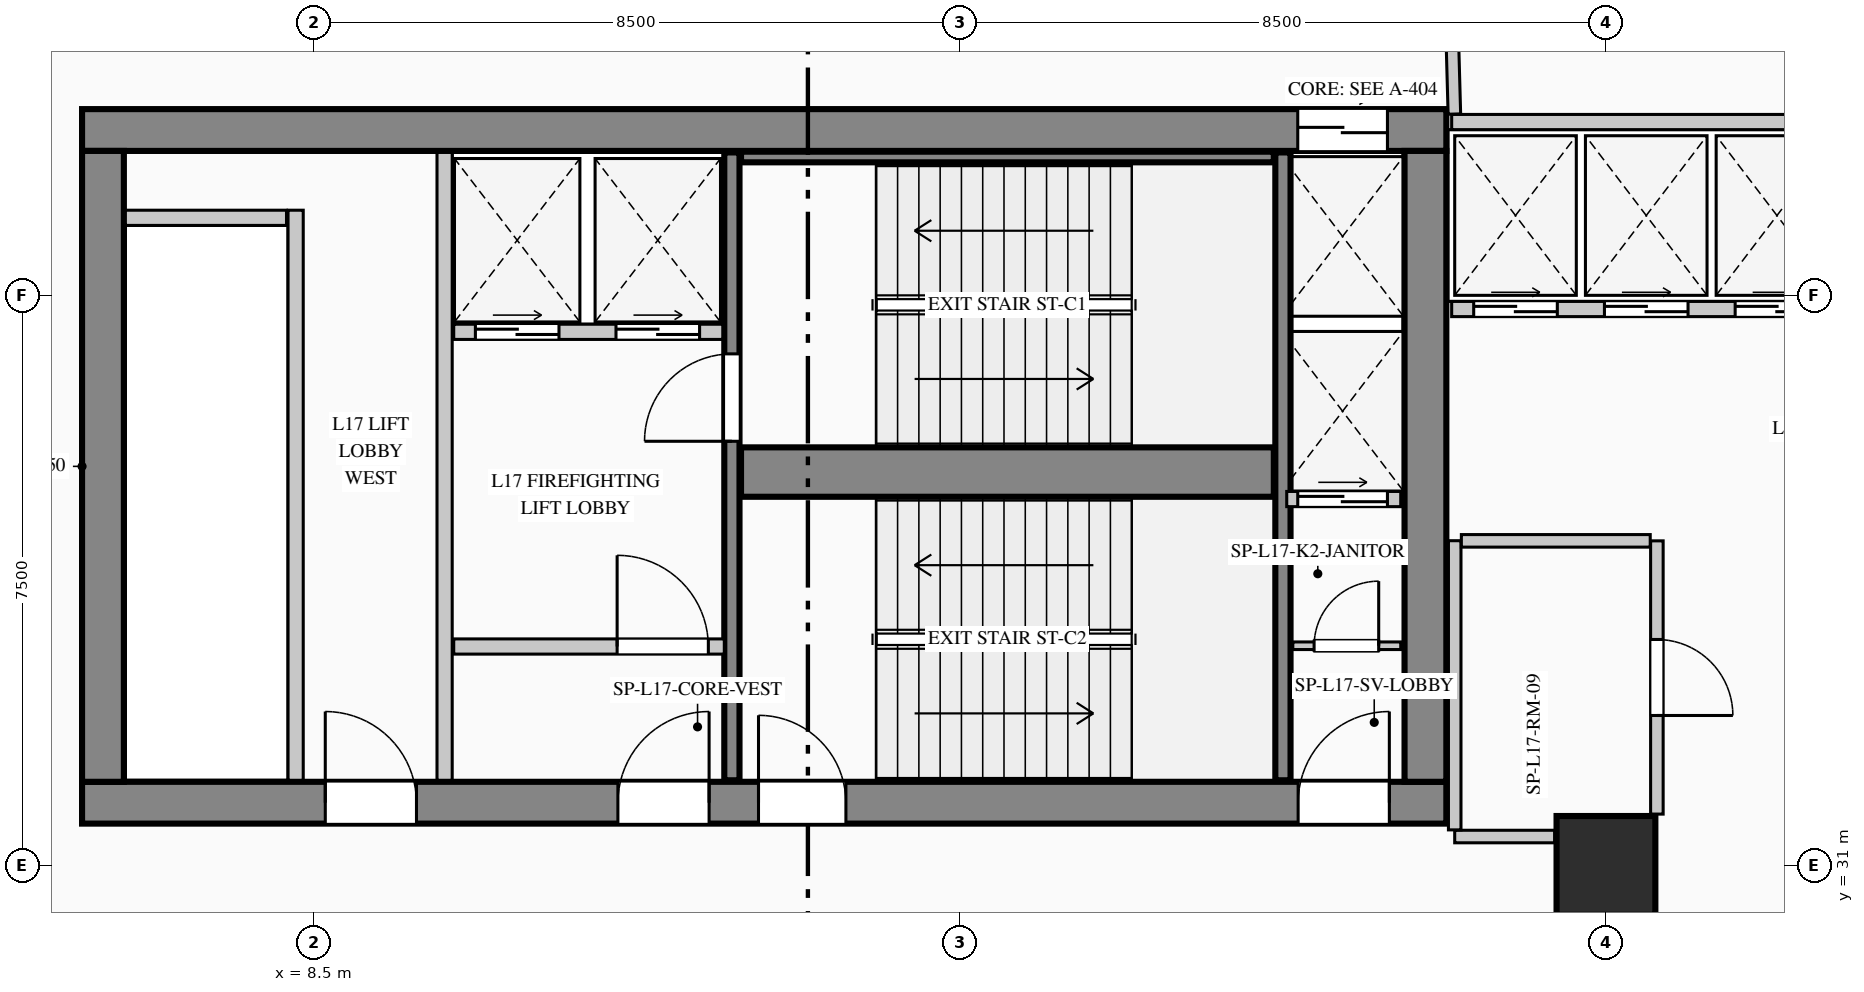
"""IFC4 building model, lengths in metres.
Left out: names, types, materials, properties, quantities, classifications, styles, units other than length and angle.
Written with IfcOpenShell. Run it as: python <this file> out.ifc"""

import sys

from ifc_helpers import new_model, si_unit, direction, frame, frame_2d, origin, origin_2d, place, context, subcontext, project, spatial, rectangle, extrude, element, fill, save


model = new_model("IFC4")
c1 = context("Model", 3, precision=1e-05, world=origin(), true_north=direction((0.0, 1.0)))
c2 = subcontext(c1, "Body", "Model", "MODEL_VIEW")
j1 = project(units=[si_unit("LENGTHUNIT", "METRE"), si_unit("PLANEANGLEUNIT", "RADIAN")], contexts=[c1])
p1 = place(None, origin())
s1 = spatial("IfcSite", under=j1, at=p1, CompositionType="ELEMENT")
p2 = place(p1, origin())
s2 = spatial("IfcBuilding", under=s1, at=p2, CompositionType="ELEMENT")
p3 = place(p2, frame((0.0, 0.0, 75.4)))
s3 = spatial("IfcBuildingStorey", under=s2, at=p3, CompositionType="ELEMENT", Elevation=75.4)
p4 = place(p3, frame((5.45, 40.675, 0.0), z_axis=(0.0, 0.0, 1.0), x_axis=(1.0, 0.0, 0.0)))
e1 = element("IfcWall", 1, at=p4, inside=s3, PredefinedType="SHEAR", context=c2, shape_type="SweptSolid", body=[
    extrude(rectangle(XDim=17.95, YDim=0.55, at=frame_2d((8.975, 0.0))), origin(), (0.0, 0.0, 1.0), 4.4),
])
p5 = place(p4, frame((15.995, 0.0, 0.0)))
e2 = element("IfcOpeningElement", 2, at=p5, cuts=e1, PredefinedType="OPENING", context=c2, shape_type="SweptSolid", body=[
    extrude(rectangle(XDim=1.18, YDim=2.25, at=frame_2d((0.59, 1.125))), frame((0.0, 0.285, 0.0), z_axis=(0.0, -1.0, 0.0), x_axis=(1.0, 0.0, 0.0)), (0.0, 0.0, 1.0), 0.57),
])
p6 = place(p3, frame((5.45, 31.825, 0.0), z_axis=(0.0, 0.0, 1.0), x_axis=(1.0, 0.0, 0.0)))
e3 = element("IfcWall", 3, at=p6, inside=s3, PredefinedType="SHEAR", context=c2, shape_type="SweptSolid", body=[
    extrude(rectangle(XDim=17.95, YDim=0.55, at=frame_2d((8.975, 0.0))), origin(), (0.0, 0.0, 1.0), 4.4),
])
p7 = place(p6, frame((3.2, 0.0, 0.0)))
e4 = element("IfcOpeningElement", 4, at=p7, cuts=e3, PredefinedType="OPENING", context=c2, shape_type="SweptSolid", body=[
    extrude(rectangle(XDim=1.2, YDim=2.2, at=frame_2d((0.6, 1.1))), frame((0.0, 0.285, 0.0), z_axis=(0.0, -1.0, 0.0), x_axis=(1.0, 0.0, 0.0)), (0.0, 0.0, 1.0), 0.57),
])
p8 = place(p6, frame((7.05, 0.0, 0.0)))
e5 = element("IfcOpeningElement", 5, at=p8, cuts=e3, PredefinedType="OPENING", context=c2, shape_type="SweptSolid", body=[
    extrude(rectangle(XDim=1.2, YDim=2.2, at=frame_2d((0.6, 1.1))), frame((0.0, 0.285, 0.0), z_axis=(0.0, -1.0, 0.0), x_axis=(1.0, 0.0, 0.0)), (0.0, 0.0, 1.0), 0.57),
])
p9 = place(p6, frame((8.9, 0.0, 0.0)))
e6 = element("IfcOpeningElement", 6, at=p9, cuts=e3, PredefinedType="OPENING", context=c2, shape_type="SweptSolid", body=[
    extrude(rectangle(XDim=1.15, YDim=2.2, at=frame_2d((0.575, 1.1))), frame((0.0, 0.285, 0.0), z_axis=(0.0, -1.0, 0.0), x_axis=(1.0, 0.0, 0.0)), (0.0, 0.0, 1.0), 0.57),
])
p10 = place(p6, frame((16.0, 0.0, 0.0)))
e7 = element("IfcOpeningElement", 7, at=p10, cuts=e3, PredefinedType="OPENING", context=c2, shape_type="SweptSolid", body=[
    extrude(rectangle(XDim=1.2, YDim=2.2, at=frame_2d((0.6, 1.1))), frame((0.0, 0.285, 0.0), z_axis=(0.0, -1.0, 0.0), x_axis=(1.0, 0.0, 0.0)), (0.0, 0.0, 1.0), 0.57),
])
for number, where, z_axis, x_axis in (
    (8, (5.725, 32.1, 0.0), (0.0, 0.0, 1.0), (0.0, 1.0, 0.0)),
    (9, (23.125, 32.1, 0.0), (0.0, 0.0, 1.0), (0.0, 1.0, 0.0)),
):
    element("IfcWall", number, at=place(p3, frame(where, z_axis=z_axis, x_axis=x_axis)), inside=s3, PredefinedType="SHEAR", context=c2, shape_type="SweptSolid", body=[
        extrude(rectangle(XDim=8.3, YDim=0.55, at=frame_2d((4.15, 0.0))), origin(), (0.0, 0.0, 1.0), 4.4),
    ])
p11 = place(p3, frame((14.0, 32.12, 0.0), z_axis=(0.0, 0.0, 1.0), x_axis=(0.0, 1.0, 0.0)))
e10 = element("IfcWall", 10, at=p11, inside=s3, PredefinedType="SHEAR", context=c2, shape_type="SweptSolid", body=[
    extrude(rectangle(XDim=8.26, YDim=0.2, at=frame_2d((4.13, 0.0))), origin(), (0.0, 0.0, 1.0), 4.4),
])
p12 = place(p11, frame((4.46, 0.0, 0.0)))
e11 = element("IfcOpeningElement", 11, at=p12, cuts=e10, PredefinedType="OPENING", context=c2, shape_type="SweptSolid", body=[
    extrude(rectangle(XDim=1.15, YDim=2.2, at=frame_2d((0.575, 1.1))), frame((0.0, 0.11, 0.0), z_axis=(0.0, -1.0, 0.0), x_axis=(1.0, 0.0, 0.0)), (0.0, 0.0, 1.0), 0.22),
])
p13 = place(p3, frame((14.12, 36.175, 0.0), z_axis=(0.0, 0.0, 1.0), x_axis=(1.0, 0.0, 0.0)))
e12 = element("IfcWall", 12, at=p13, inside=s3, PredefinedType="SHEAR", context=c2, shape_type="SweptSolid", body=[
    extrude(rectangle(XDim=7.01, YDim=0.65, at=frame_2d((3.505, 0.0))), origin(), (0.0, 0.0, 1.0), 4.4),
])
p14 = place(p3, frame((21.25, 32.12, 0.0), z_axis=(0.0, 0.0, 1.0), x_axis=(0.0, 1.0, 0.0)))
e13 = element("IfcWall", 13, at=p14, inside=s3, PredefinedType="SHEAR", context=c2, shape_type="SweptSolid", body=[
    extrude(rectangle(XDim=8.26, YDim=0.2, at=frame_2d((4.13, 0.0))), origin(), (0.0, 0.0, 1.0), 4.4),
])
p15 = place(p3, frame((14.12, 40.32, 0.0), z_axis=(0.0, 0.0, 1.0), x_axis=(1.0, 0.0, 0.0)))
e14 = element("IfcWall", 14, at=p15, inside=s3, PredefinedType="SHEAR", context=c2, shape_type="SweptSolid", body=[
    extrude(rectangle(XDim=7.01, YDim=0.14, at=frame_2d((3.505, 0.0))), origin(), (0.0, 0.0, 1.0), 4.4),
])
p16 = place(p3, frame((25.5, 31.0, 0.0), z_axis=(0.0, 0.0, 1.0), x_axis=(1.0, 0.0, 0.0)))
e15 = element("IfcColumn", 15, at=p16, inside=s3, PredefinedType="COLUMN", context=c2, shape_type="SweptSolid", body=[
    extrude(rectangle(XDim=1.3, YDim=1.3, at=origin_2d()), origin(), (0.0, 0.0, 1.0), 4.4),
])
p17 = place(p3, frame((8.523, 4.84, 0.0), z_axis=(0.0, 0.0, 1.0), x_axis=(-0.150394554312, 0.988626055712, 0.0)))
e16 = element("IfcWall", 16, at=p17, inside=s3, PredefinedType="STANDARD", context=c2, shape_type="SweptSolid", body=[
    extrude(rectangle(XDim=36.738, YDim=0.28, at=frame_2d((18.369, 0.0))), origin(), (0.0, 0.0, 1.0), 4.115),
])
p18 = place(p17, frame((22.612, 0.0, 0.9)))
e17 = element("IfcOpeningElement", 17, at=p18, cuts=e16, PredefinedType="OPENING", context=c2, shape_type="SweptSolid", body=[
    extrude(rectangle(XDim=1.8, YDim=2.1, at=frame_2d((0.9, 1.05))), frame((0.0, 0.15, 0.0), z_axis=(0.0, -1.0, 0.0), x_axis=(1.0, 0.0, 0.0)), (0.0, 0.0, 1.0), 0.3),
])
p19 = place(p3, frame((8.26, 32.12, 0.0), z_axis=(0.0, 0.0, 1.0), x_axis=(0.0, 1.0, 0.0)))
e18 = element("IfcWall", 18, at=p19, inside=s3, PredefinedType="PARTITIONING", context=c2, shape_type="SweptSolid", body=[
    extrude(rectangle(XDim=7.5, YDim=0.2, at=frame_2d((3.75, 0.0))), origin(), (0.0, 0.0, 1.0), 4.115),
])
p20 = place(p3, frame((6.02, 39.52, 0.0), z_axis=(0.0, 0.0, 1.0), x_axis=(1.0, 0.0, 0.0)))
e19 = element("IfcWall", 19, at=p20, inside=s3, PredefinedType="PARTITIONING", context=c2, shape_type="SweptSolid", body=[
    extrude(rectangle(XDim=2.12, YDim=0.2, at=frame_2d((1.06, 0.0))), origin(), (0.0, 0.0, 1.0), 4.115),
])
p21 = place(p3, frame((10.22, 32.12, 0.0), z_axis=(0.0, 0.0, 1.0), x_axis=(0.0, 1.0, 0.0)))
e20 = element("IfcWall", 20, at=p21, inside=s3, PredefinedType="PARTITIONING", context=c2, shape_type="SweptSolid", body=[
    extrude(rectangle(XDim=8.26, YDim=0.2, at=frame_2d((4.13, 0.0))), origin(), (0.0, 0.0, 1.0), 4.115),
])
p22 = place(p3, frame((10.34, 38.02, 0.0), z_axis=(0.0, 0.0, 1.0), x_axis=(1.0, 0.0, 0.0)))
e21 = element("IfcWall", 21, at=p22, inside=s3, PredefinedType="PARTITIONING", context=c2, shape_type="SweptSolid", body=[
    extrude(rectangle(XDim=3.54, YDim=0.2, at=frame_2d((1.77, 0.0))), origin(), (0.0, 0.0, 1.0), 4.115),
])
p23 = place(p22, frame((0.285, 0.0, 0.0)))
e22 = element("IfcOpeningElement", 22, at=p23, cuts=e21, PredefinedType="OPENING", context=c2, shape_type="SweptSolid", body=[
    extrude(rectangle(XDim=1.1, YDim=2.2, at=frame_2d((0.55, 1.1))), frame((0.0, 0.11, 0.0), z_axis=(0.0, -1.0, 0.0), x_axis=(1.0, 0.0, 0.0)), (0.0, 0.0, 1.0), 0.22),
])
p24 = place(p22, frame((2.135, 0.0, 0.0)))
e23 = element("IfcOpeningElement", 23, at=p24, cuts=e21, PredefinedType="OPENING", context=c2, shape_type="SweptSolid", body=[
    extrude(rectangle(XDim=1.1, YDim=2.2, at=frame_2d((0.55, 1.1))), frame((0.0, 0.11, 0.0), z_axis=(0.0, -1.0, 0.0), x_axis=(1.0, 0.0, 0.0)), (0.0, 0.0, 1.0), 0.22),
])
p25 = place(p3, frame((10.34, 33.88, 0.0), z_axis=(0.0, 0.0, 1.0), x_axis=(1.0, 0.0, 0.0)))
e24 = element("IfcWall", 24, at=p25, inside=s3, PredefinedType="PARTITIONING", context=c2, shape_type="SweptSolid", body=[
    extrude(rectangle(XDim=3.56, YDim=0.2, at=frame_2d((1.78, 0.0))), origin(), (0.0, 0.0, 1.0), 4.115),
])
p26 = place(p25, frame((2.15, 0.0, 0.0)))
e25 = element("IfcOpeningElement", 25, at=p26, cuts=e24, PredefinedType="OPENING", context=c2, shape_type="SweptSolid", body=[
    extrude(rectangle(XDim=1.2, YDim=2.2, at=frame_2d((0.6, 1.1))), frame((0.0, 0.11, 0.0), z_axis=(0.0, -1.0, 0.0), x_axis=(1.0, 0.0, 0.0)), (0.0, 0.0, 1.0), 0.22),
])
p27 = place(p3, frame((21.38, 33.89, 0.0), z_axis=(0.0, 0.0, 1.0), x_axis=(1.0, 0.0, 0.0)))
e26 = element("IfcWall", 26, at=p27, inside=s3, PredefinedType="PARTITIONING", context=c2, shape_type="SweptSolid", body=[
    extrude(rectangle(XDim=1.42, YDim=0.1, at=frame_2d((0.71, 0.0))), origin(), (0.0, 0.0, 1.0), 4.115),
])
p28 = place(p27, frame((0.28, 0.0, 0.0)))
e27 = element("IfcOpeningElement", 27, at=p28, cuts=e26, PredefinedType="OPENING", context=c2, shape_type="SweptSolid", body=[
    extrude(rectangle(XDim=0.85, YDim=2.1, at=frame_2d((0.425, 1.05))), frame((0.0, 0.06, 0.0), z_axis=(0.0, -1.0, 0.0), x_axis=(1.0, 0.0, 0.0)), (0.0, 0.0, 1.0), 0.12),
])
p29 = place(p3, frame((21.3, 35.82, 0.0), z_axis=(0.0, 0.0, 1.0), x_axis=(1.0, 0.0, 0.0)))
e28 = element("IfcWall", 28, at=p29, inside=s3, PredefinedType="PARTITIONING", context=c2, shape_type="SweptSolid", body=[
    extrude(rectangle(XDim=1.5, YDim=0.2, at=frame_2d((0.75, 0.0))), origin(), (0.0, 0.0, 1.0), 4.115),
])
p30 = place(p29, frame((0.145, 0.0, 0.0)))
e29 = element("IfcOpeningElement", 29, at=p30, cuts=e28, PredefinedType="OPENING", context=c2, shape_type="SweptSolid", body=[
    extrude(rectangle(XDim=1.18, YDim=2.25, at=frame_2d((0.59, 1.125))), frame((0.0, 0.11, 0.0), z_axis=(0.0, -1.0, 0.0), x_axis=(1.0, 0.0, 0.0)), (0.0, 0.0, 1.0), 0.22),
])
p31 = place(p3, frame((23.47, 40.78, 0.0), z_axis=(0.0, 0.0, 1.0), x_axis=(1.0, 0.0, 0.0)))
e30 = element("IfcWall", 30, at=p31, inside=s3, PredefinedType="PARTITIONING", context=c2, shape_type="SweptSolid", body=[
    extrude(rectangle(XDim=6.91, YDim=0.2, at=frame_2d((3.455, 0.0))), origin(), (0.0, 0.0, 1.0), 4.115),
])
p32 = place(p3, frame((23.47, 38.32, 0.0), z_axis=(0.0, 0.0, 1.0), x_axis=(1.0, 0.0, 0.0)))
e31 = element("IfcWall", 31, at=p32, inside=s3, PredefinedType="PARTITIONING", context=c2, shape_type="SweptSolid", body=[
    extrude(rectangle(XDim=6.79, YDim=0.2, at=frame_2d((3.395, 0.0))), origin(), (0.0, 0.0, 1.0), 4.115),
])
p33 = place(p32, frame((0.29, 0.0, 0.0)))
e32 = element("IfcOpeningElement", 32, at=p33, cuts=e31, PredefinedType="OPENING", context=c2, shape_type="SweptSolid", body=[
    extrude(rectangle(XDim=1.1, YDim=2.2, at=frame_2d((0.55, 1.1))), frame((0.0, 0.11, 0.0), z_axis=(0.0, -1.0, 0.0), x_axis=(1.0, 0.0, 0.0)), (0.0, 0.0, 1.0), 0.22),
])
p34 = place(p32, frame((2.01, 0.0, 0.0)))
e33 = element("IfcOpeningElement", 33, at=p34, cuts=e31, PredefinedType="OPENING", context=c2, shape_type="SweptSolid", body=[
    extrude(rectangle(XDim=1.1, YDim=2.2, at=frame_2d((0.55, 1.1))), frame((0.0, 0.11, 0.0), z_axis=(0.0, -1.0, 0.0), x_axis=(1.0, 0.0, 0.0)), (0.0, 0.0, 1.0), 0.22),
])
p35 = place(p32, frame((3.73, 0.0, 0.0)))
e34 = element("IfcOpeningElement", 34, at=p35, cuts=e31, PredefinedType="OPENING", context=c2, shape_type="SweptSolid", body=[
    extrude(rectangle(XDim=1.1, YDim=2.2, at=frame_2d((0.55, 1.1))), frame((0.0, 0.11, 0.0), z_axis=(0.0, -1.0, 0.0), x_axis=(1.0, 0.0, 0.0)), (0.0, 0.0, 1.0), 0.22),
])
p36 = place(p32, frame((5.45, 0.0, 0.0)))
e35 = element("IfcOpeningElement", 35, at=p36, cuts=e31, PredefinedType="OPENING", context=c2, shape_type="SweptSolid", body=[
    extrude(rectangle(XDim=1.1, YDim=2.2, at=frame_2d((0.55, 1.1))), frame((0.0, 0.11, 0.0), z_axis=(0.0, -1.0, 0.0), x_axis=(1.0, 0.0, 0.0)), (0.0, 0.0, 1.0), 0.22),
])
p37 = place(p3, frame((26.17, 35.27, 0.0), z_axis=(0.0, 0.0, 1.0), x_axis=(0.0, -1.0, 0.0)))
e36 = element("IfcWall", 36, at=p37, inside=s3, PredefinedType="PARTITIONING", context=c2, shape_type="SweptSolid", body=[
    extrude(rectangle(XDim=3.595, YDim=0.165, at=frame_2d((1.797, 0.0))), origin(), (0.0, 0.0, 1.0), 4.115),
])
p38 = place(p37, frame((1.298, 0.0, 0.0)))
e37 = element("IfcOpeningElement", 37, at=p38, cuts=e36, PredefinedType="OPENING", context=c2, shape_type="SweptSolid", body=[
    extrude(rectangle(XDim=1.0, YDim=2.15, at=frame_2d((0.5, 1.075))), frame((0.0, 0.093, 0.0), z_axis=(0.0, -1.0, 0.0), x_axis=(1.0, 0.0, 0.0)), (0.0, 0.0, 1.0), 0.185),
])
p39 = place(p3, frame((24.825, 31.38, 0.0), z_axis=(0.0, 0.0, 1.0), x_axis=(-1.0, 0.0, 0.0)))
e38 = element("IfcWall", 38, at=p39, inside=s3, PredefinedType="PARTITIONING", context=c2, shape_type="SweptSolid", body=[
    extrude(rectangle(XDim=1.315, YDim=0.165, at=frame_2d((0.657, 0.0))), origin(), (0.0, 0.0, 1.0), 4.115),
])
p40 = place(p3, frame((23.51, 31.468, 0.0), z_axis=(0.0, 0.0, 1.0), x_axis=(0.0, 1.0, 0.0)))
e39 = element("IfcWall", 39, at=p40, inside=s3, PredefinedType="PARTITIONING", context=c2, shape_type="SweptSolid", body=[
    extrude(rectangle(XDim=3.804, YDim=0.165, at=frame_2d((1.902, 0.0))), origin(), (0.0, 0.0, 1.0), 4.115),
])
p41 = place(p3, frame((23.597, 35.27, 0.0), z_axis=(0.0, 0.0, 1.0), x_axis=(1.0, 0.0, 0.0)))
e40 = element("IfcWall", 40, at=p41, inside=s3, PredefinedType="PARTITIONING", context=c2, shape_type="SweptSolid", body=[
    extrude(rectangle(XDim=2.485, YDim=0.165, at=frame_2d((1.243, 0.0))), origin(), (0.0, 0.0, 1.0), 4.115),
])
p42 = place(p3, frame((23.506, 40.885, 0.0), z_axis=(0.0, 0.0, 1.0), x_axis=(-0.027441464163, 0.999623412113, 0.0)))
e41 = element("IfcWall", 41, at=p42, inside=s3, PredefinedType="PARTITIONING", context=c2, shape_type="SweptSolid", body=[
    extrude(rectangle(XDim=2.331, YDim=0.165, at=frame_2d((1.166, 0.0))), origin(), (0.0, 0.0, 1.0), 4.115),
])
p43 = place(p7, origin())
e42 = element("IfcDoor", 42, at=p43, inside=s3, OperationType="SINGLE_SWING_LEFT", PredefinedType="DOOR", context=c2, shape_type="SweptSolid", body=[
    extrude(rectangle(XDim=1.2, YDim=2.2, at=frame_2d((0.6, 1.1))), frame((0.0, 0.025, 0.0), z_axis=(0.0, -1.0, 0.0), x_axis=(1.0, 0.0, 0.0)), (0.0, 0.0, 1.0), 0.05),
])
fill(e4, e42)
p44 = place(p8, origin())
e43 = element("IfcDoor", 43, at=p44, inside=s3, OperationType="SINGLE_SWING_RIGHT", PredefinedType="DOOR", context=c2, shape_type="SweptSolid", body=[
    extrude(rectangle(XDim=1.2, YDim=2.2, at=frame_2d((0.6, 1.1))), frame((0.0, 0.025, 0.0), z_axis=(0.0, -1.0, 0.0), x_axis=(1.0, 0.0, 0.0)), (0.0, 0.0, 1.0), 0.05),
])
fill(e5, e43)
p45 = place(p9, origin())
e44 = element("IfcDoor", 44, at=p45, inside=s3, OperationType="SINGLE_SWING_LEFT", PredefinedType="DOOR", context=c2, shape_type="SweptSolid", body=[
    extrude(rectangle(XDim=1.15, YDim=2.2, at=frame_2d((0.575, 1.1))), frame((0.0, 0.025, 0.0), z_axis=(0.0, -1.0, 0.0), x_axis=(1.0, 0.0, 0.0)), (0.0, 0.0, 1.0), 0.05),
])
fill(e6, e44)
p46 = place(p10, origin())
e45 = element("IfcDoor", 45, at=p46, inside=s3, OperationType="SINGLE_SWING_RIGHT", PredefinedType="DOOR", context=c2, shape_type="SweptSolid", body=[
    extrude(rectangle(XDim=1.2, YDim=2.2, at=frame_2d((0.6, 1.1))), frame((0.0, 0.025, 0.0), z_axis=(0.0, -1.0, 0.0), x_axis=(1.0, 0.0, 0.0)), (0.0, 0.0, 1.0), 0.05),
])
fill(e7, e45)
p47 = place(p26, origin())
e46 = element("IfcDoor", 46, at=p47, inside=s3, OperationType="SINGLE_SWING_LEFT", PredefinedType="DOOR", context=c2, shape_type="SweptSolid", body=[
    extrude(rectangle(XDim=1.2, YDim=2.2, at=frame_2d((0.6, 1.1))), frame((0.0, 0.025, 0.0), z_axis=(0.0, -1.0, 0.0), x_axis=(1.0, 0.0, 0.0)), (0.0, 0.0, 1.0), 0.05),
])
fill(e25, e46)
p48 = place(p28, origin())
e47 = element("IfcDoor", 47, at=p48, inside=s3, OperationType="SINGLE_SWING_RIGHT", PredefinedType="DOOR", context=c2, shape_type="SweptSolid", body=[
    extrude(rectangle(XDim=0.85, YDim=2.1, at=frame_2d((0.425, 1.05))), frame((0.0, 0.025, 0.0), z_axis=(0.0, -1.0, 0.0), x_axis=(1.0, 0.0, 0.0)), (0.0, 0.0, 1.0), 0.05),
])
fill(e27, e47)
p49 = place(p12, origin())
e48 = element("IfcDoor", 48, at=p49, inside=s3, OperationType="SINGLE_SWING_LEFT", PredefinedType="DOOR", context=c2, shape_type="SweptSolid", body=[
    extrude(rectangle(XDim=1.15, YDim=2.2, at=frame_2d((0.575, 1.1))), frame((0.0, 0.025, 0.0), z_axis=(0.0, -1.0, 0.0), x_axis=(1.0, 0.0, 0.0)), (0.0, 0.0, 1.0), 0.05),
])
fill(e11, e48)
p50 = place(p23, origin())
e49 = element("IfcDoor", 49, at=p50, inside=s3, OperationType="DOUBLE_DOOR_SLIDING", PredefinedType="DOOR", context=c2, shape_type="SweptSolid", body=[
    extrude(rectangle(XDim=1.1, YDim=2.2, at=frame_2d((0.55, 1.1))), frame((0.0, 0.025, 0.0), z_axis=(0.0, -1.0, 0.0), x_axis=(1.0, 0.0, 0.0)), (0.0, 0.0, 1.0), 0.05),
])
fill(e22, e49)
p51 = place(p24, origin())
e50 = element("IfcDoor", 50, at=p51, inside=s3, OperationType="DOUBLE_DOOR_SLIDING", PredefinedType="DOOR", context=c2, shape_type="SweptSolid", body=[
    extrude(rectangle(XDim=1.1, YDim=2.2, at=frame_2d((0.55, 1.1))), frame((0.0, 0.025, 0.0), z_axis=(0.0, -1.0, 0.0), x_axis=(1.0, 0.0, 0.0)), (0.0, 0.0, 1.0), 0.05),
])
fill(e23, e50)
p52 = place(p5, origin())
e51 = element("IfcDoor", 51, at=p52, inside=s3, OperationType="DOUBLE_DOOR_SLIDING", PredefinedType="DOOR", context=c2, shape_type="SweptSolid", body=[
    extrude(rectangle(XDim=1.18, YDim=2.25, at=frame_2d((0.59, 1.125))), frame((0.0, 0.025, 0.0), z_axis=(0.0, -1.0, 0.0), x_axis=(1.0, 0.0, 0.0)), (0.0, 0.0, 1.0), 0.05),
])
fill(e2, e51)
p53 = place(p30, origin())
e52 = element("IfcDoor", 52, at=p53, inside=s3, OperationType="DOUBLE_DOOR_SLIDING", PredefinedType="DOOR", context=c2, shape_type="SweptSolid", body=[
    extrude(rectangle(XDim=1.18, YDim=2.25, at=frame_2d((0.59, 1.125))), frame((0.0, 0.025, 0.0), z_axis=(0.0, -1.0, 0.0), x_axis=(1.0, 0.0, 0.0)), (0.0, 0.0, 1.0), 0.05),
])
fill(e29, e52)
p54 = place(p33, origin())
e53 = element("IfcDoor", 53, at=p54, inside=s3, OperationType="DOUBLE_DOOR_SLIDING", PredefinedType="DOOR", context=c2, shape_type="SweptSolid", body=[
    extrude(rectangle(XDim=1.1, YDim=2.2, at=frame_2d((0.55, 1.1))), frame((0.0, 0.025, 0.0), z_axis=(0.0, -1.0, 0.0), x_axis=(1.0, 0.0, 0.0)), (0.0, 0.0, 1.0), 0.05),
])
fill(e32, e53)
p55 = place(p34, origin())
e54 = element("IfcDoor", 54, at=p55, inside=s3, OperationType="DOUBLE_DOOR_SLIDING", PredefinedType="DOOR", context=c2, shape_type="SweptSolid", body=[
    extrude(rectangle(XDim=1.1, YDim=2.2, at=frame_2d((0.55, 1.1))), frame((0.0, 0.025, 0.0), z_axis=(0.0, -1.0, 0.0), x_axis=(1.0, 0.0, 0.0)), (0.0, 0.0, 1.0), 0.05),
])
fill(e33, e54)
p56 = place(p35, origin())
e55 = element("IfcDoor", 55, at=p56, inside=s3, OperationType="DOUBLE_DOOR_SLIDING", PredefinedType="DOOR", context=c2, shape_type="SweptSolid", body=[
    extrude(rectangle(XDim=1.1, YDim=2.2, at=frame_2d((0.55, 1.1))), frame((0.0, 0.025, 0.0), z_axis=(0.0, -1.0, 0.0), x_axis=(1.0, 0.0, 0.0)), (0.0, 0.0, 1.0), 0.05),
])
fill(e34, e55)
p57 = place(p38, origin())
e56 = element("IfcDoor", 56, at=p57, inside=s3, OperationType="SINGLE_SWING_RIGHT", PredefinedType="DOOR", context=c2, shape_type="SweptSolid", body=[
    extrude(rectangle(XDim=1.0, YDim=2.15, at=frame_2d((0.5, 1.075))), frame((0.0, 0.025, 0.0), z_axis=(0.0, -1.0, 0.0), x_axis=(1.0, 0.0, 0.0)), (0.0, 0.0, 1.0), 0.05),
])
fill(e37, e56)
save(model, sys.argv[1])
